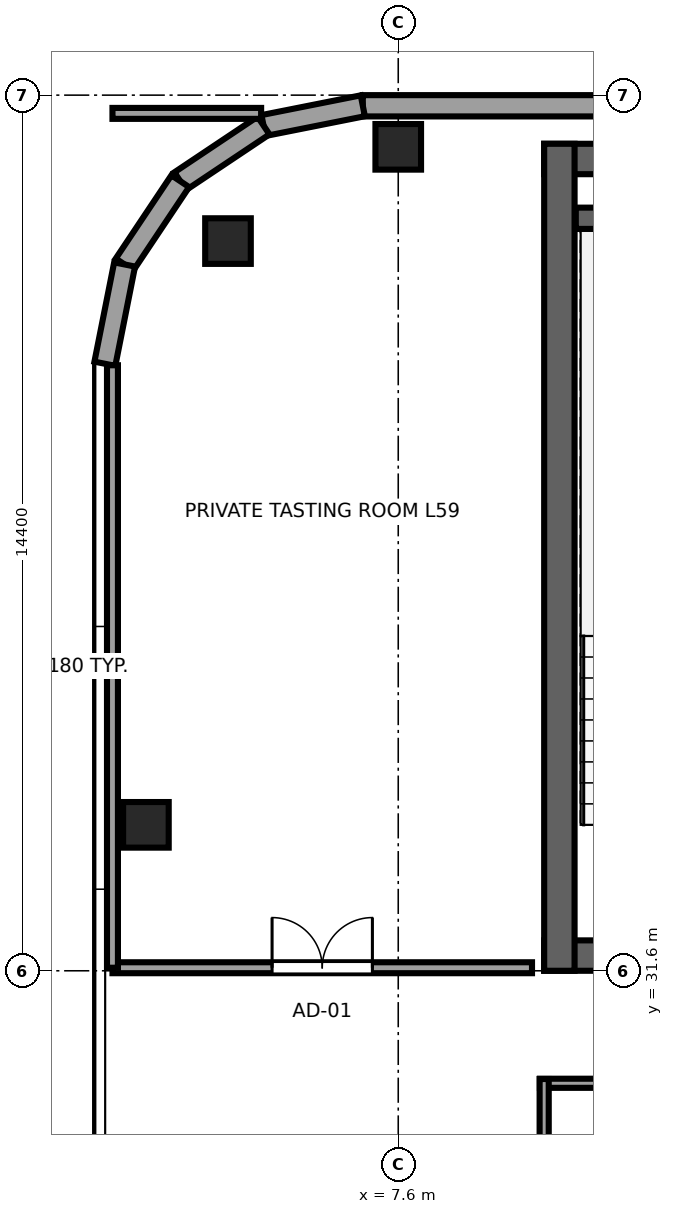
"""IFC4 building model, lengths in metres.
Left out: names, types, materials, properties, quantities, classifications, styles, units other than length and angle.
Written with IfcOpenShell. Run it as: python <this file> out.ifc"""

import sys

from ifc_helpers import new_model, si_unit, direction, frame, frame_2d, origin, origin_2d, place, context, subcontext, project, spatial, rectangle, extrude, source, transform, mapped, element, fill, save


model = new_model("IFC4")
c1 = context("Model", 3, precision=1e-05, world=origin(), true_north=direction((0.0, 1.0)))
c2 = subcontext(c1, "Body", "Model", "MODEL_VIEW")
j1 = project(units=[si_unit("LENGTHUNIT", "METRE"), si_unit("PLANEANGLEUNIT", "RADIAN")], contexts=[c1])
p1 = place(None, origin())
s1 = spatial("IfcSite", under=j1, at=p1, CompositionType="ELEMENT")
p2 = place(p1, origin())
s2 = spatial("IfcBuilding", under=s1, at=p2, CompositionType="ELEMENT")
p3 = place(p2, frame((0.0, 0.0, 223.9)))
s3 = spatial("IfcBuildingStorey", under=s2, at=p3, CompositionType="ELEMENT", Elevation=223.9)
p4 = place(p3, frame((10.0, 31.85, 0.0), z_axis=(0.0, 0.0, 1.0), x_axis=(1.0, 0.0, 0.0)))
e1 = element("IfcWall", 1, at=p4, inside=s3, PredefinedType="SHEAR", context=c2, shape_type="SweptSolid", body=[
    extrude(rectangle(XDim=26.0, YDim=0.5, at=frame_2d((13.0, 0.0))), origin(), (0.0, 0.0, 1.0), 3.55),
])
p5 = place(p4, frame((7.45, 0.0, 0.0), z_axis=(0.0, 0.0, 1.0), x_axis=(-1.0, 0.0, 0.0)))
e2 = element("IfcOpeningElement", 2, at=p5, cuts=e1, PredefinedType="OPENING", context=c2, shape_type="SweptSolid", body=[
    extrude(rectangle(XDim=1.5, YDim=2.04, at=frame_2d((0.75, 1.02))), frame((0.0, 0.26, 0.0), z_axis=(0.0, -1.0, 0.0), x_axis=(1.0, 0.0, 0.0)), (0.0, 0.0, 1.0), 0.52),
])
p6 = place(p4, frame((13.75, 0.0, 0.0), z_axis=(0.0, 0.0, 1.0), x_axis=(-1.0, 0.0, 0.0)))
e3 = element("IfcOpeningElement", 3, at=p6, cuts=e1, PredefinedType="OPENING", context=c2, shape_type="SweptSolid", body=[
    extrude(rectangle(XDim=1.5, YDim=2.04, at=frame_2d((0.75, 1.02))), frame((0.0, 0.26, 0.0), z_axis=(0.0, -1.0, 0.0), x_axis=(1.0, 0.0, 0.0)), (0.0, 0.0, 1.0), 0.52),
])
p7 = place(p4, frame((20.05, 0.0, 0.0), z_axis=(0.0, 0.0, 1.0), x_axis=(-1.0, 0.0, 0.0)))
e4 = element("IfcOpeningElement", 4, at=p7, cuts=e1, PredefinedType="OPENING", context=c2, shape_type="SweptSolid", body=[
    extrude(rectangle(XDim=1.5, YDim=2.04, at=frame_2d((0.75, 1.02))), frame((0.0, 0.26, 0.0), z_axis=(0.0, -1.0, 0.0), x_axis=(1.0, 0.0, 0.0)), (0.0, 0.0, 1.0), 0.52),
])
p8 = place(p3, frame((10.0, 44.95, 0.0), z_axis=(0.0, 0.0, 1.0), x_axis=(1.0, 0.0, 0.0)))
e5 = element("IfcWall", 5, at=p8, inside=s3, PredefinedType="SHEAR", context=c2, shape_type="SweptSolid", body=[
    extrude(rectangle(XDim=26.0, YDim=0.5, at=frame_2d((13.0, 0.0))), origin(), (0.0, 0.0, 1.0), 3.55),
])
p9 = place(p3, frame((10.25, 31.6, 0.0), z_axis=(0.0, 0.0, 1.0), x_axis=(0.0, 1.0, 0.0)))
e6 = element("IfcWall", 6, at=p9, inside=s3, PredefinedType="SHEAR", context=c2, shape_type="SweptSolid", body=[
    extrude(rectangle(XDim=13.6, YDim=0.5, at=frame_2d((6.8, 0.0))), origin(), (0.0, 0.0, 1.0), 3.55),
])
p10 = place(p3, frame((10.52, 43.975, 0.0), z_axis=(0.0, 0.0, 1.0), x_axis=(1.0, 0.0, 0.0)))
e7 = element("IfcWall", 7, at=p10, inside=s3, PredefinedType="SHEAR", context=c2, shape_type="SweptSolid", body=[
    extrude(rectangle(XDim=3.6, YDim=0.35, at=frame_2d((1.8, 0.0))), origin(), (0.0, 0.0, 1.0), 3.55),
])
m1 = source(origin(), c2, "Body", "SweptSolid", [
    extrude(rectangle(XDim=0.75, YDim=0.75, at=origin_2d()), origin(), (0.0, 0.0, 1.0), 3.55),
])
for number, where, z_axis, x_axis in (
    (8, (4.8, 43.6, 0.0), (0.0, 0.0, 1.0), (1.0, 0.0, 0.0)),
    (9, (7.6, 45.15, 0.0), (0.0, 0.0, 1.0), (1.0, 0.0, 0.0)),
    (10, (3.45, 34.0, 0.0), (0.0, 0.0, 1.0), (1.0, 0.0, 0.0)),
):
    element("IfcColumn", number, at=place(p3, frame(where, z_axis=z_axis, x_axis=x_axis)), inside=s3, PredefinedType="COLUMN", context=c2, shape_type="MappedRepresentation", body=[
        mapped(m1, transform((0.0, 0.0, 0.0), x_axis=(1.0, 0.0, 0.0), y_axis=(0.0, 1.0, 0.0), z_axis=(0.0, 0.0, 1.0), scale=1.0)),
    ])
p11 = place(p3, frame((35.383, 45.825, 0.0), z_axis=(0.0, 0.0, 1.0), x_axis=(-1.0, 0.0, 0.0)))
e11 = element("IfcWall", 11, at=p11, inside=s3, PredefinedType="SOLIDWALL", context=c2, shape_type="SweptSolid", body=[
    extrude(rectangle(XDim=28.366, YDim=0.35, at=frame_2d((14.183, 0.0))), origin(), (0.0, 0.0, 1.0), 3.37),
])
p12 = place(p11, frame((1.514, 0.0, 0.68)))
e12 = element("IfcOpeningElement", 12, at=p12, cuts=e11, PredefinedType="OPENING", context=c2, shape_type="SweptSolid", body=[
    extrude(rectangle(XDim=2.7, YDim=1.95, at=frame_2d((1.35, 0.975))), frame((0.0, 0.185, 0.0), z_axis=(0.0, -1.0, 0.0), x_axis=(1.0, 0.0, 0.0)), (0.0, 0.0, 1.0), 0.37),
])
p13 = place(p11, frame((6.041, 0.0, 0.68)))
e13 = element("IfcOpeningElement", 13, at=p13, cuts=e11, PredefinedType="OPENING", context=c2, shape_type="SweptSolid", body=[
    extrude(rectangle(XDim=2.7, YDim=1.95, at=frame_2d((1.35, 0.975))), frame((0.0, 0.185, 0.0), z_axis=(0.0, -1.0, 0.0), x_axis=(1.0, 0.0, 0.0)), (0.0, 0.0, 1.0), 0.37),
])
p14 = place(p11, frame((10.569, 0.0, 0.68)))
e14 = element("IfcOpeningElement", 14, at=p14, cuts=e11, PredefinedType="OPENING", context=c2, shape_type="SweptSolid", body=[
    extrude(rectangle(XDim=2.7, YDim=1.95, at=frame_2d((1.35, 0.975))), frame((0.0, 0.185, 0.0), z_axis=(0.0, -1.0, 0.0), x_axis=(1.0, 0.0, 0.0)), (0.0, 0.0, 1.0), 0.37),
])
p15 = place(p11, frame((15.097, 0.0, 0.68)))
e15 = element("IfcOpeningElement", 15, at=p15, cuts=e11, PredefinedType="OPENING", context=c2, shape_type="SweptSolid", body=[
    extrude(rectangle(XDim=2.7, YDim=1.95, at=frame_2d((1.35, 0.975))), frame((0.0, 0.185, 0.0), z_axis=(0.0, -1.0, 0.0), x_axis=(1.0, 0.0, 0.0)), (0.0, 0.0, 1.0), 0.37),
])
p16 = place(p11, frame((19.624, 0.0, 0.68)))
e16 = element("IfcOpeningElement", 16, at=p16, cuts=e11, PredefinedType="OPENING", context=c2, shape_type="SweptSolid", body=[
    extrude(rectangle(XDim=2.7, YDim=1.95, at=frame_2d((1.35, 0.975))), frame((0.0, 0.185, 0.0), z_axis=(0.0, -1.0, 0.0), x_axis=(1.0, 0.0, 0.0)), (0.0, 0.0, 1.0), 0.37),
])
p17 = place(p3, frame((7.017, 45.825, 0.0), z_axis=(0.0, 0.0, 1.0), x_axis=(-0.980788844421, -0.195072403631, 0.0)))
e17 = element("IfcWall", 17, at=p17, inside=s3, PredefinedType="SOLIDWALL", context=c2, shape_type="SweptSolid", body=[
    extrude(rectangle(XDim=1.665, YDim=0.35, at=frame_2d((0.832, 0.0))), origin(), (0.0, 0.0, 1.0), 3.37),
])
for number, where, z_axis, x_axis in (
    (18, (5.385, 45.5, 0.0), (0.0, 0.0, 1.0), (-0.832, -0.556, 0.0)),
    (19, (4.015, 44.585, 0.0), (0.0, 0.0, 1.0), (-0.556, -0.831, 0.0)),
):
    element("IfcWall", number, at=place(p3, frame(where, z_axis=z_axis, x_axis=x_axis)), inside=s3, PredefinedType="SOLIDWALL", context=c2, shape_type="SweptSolid", body=[
        extrude(rectangle(XDim=1.647, YDim=0.35, at=frame_2d((0.824, 0.0))), origin(), (0.0, 0.0, 1.0), 2.9),
    ])
p18 = place(p3, frame((3.1, 43.216, 0.0), z_axis=(0.0, 0.0, 1.0), x_axis=(-0.195044345786, -0.980794424524, 0.0)))
e20 = element("IfcWall", 20, at=p18, inside=s3, PredefinedType="SOLIDWALL", context=c2, shape_type="SweptSolid", body=[
    extrude(rectangle(XDim=1.665, YDim=0.35, at=frame_2d((0.833, 0.0))), origin(), (0.0, 0.0, 1.0), 3.37),
])
p19 = place(p3, frame((2.9, 31.65, 0.0), z_axis=(0.0, 0.0, 1.0), x_axis=(1.0, 0.0, 0.0)))
e21 = element("IfcWall", 21, at=p19, inside=s3, PredefinedType="PARTITIONING", context=c2, shape_type="SweptSolid", body=[
    extrude(rectangle(XDim=6.9, YDim=0.18, at=frame_2d((3.45, 0.0))), origin(), (0.0, 0.0, 1.0), 3.37),
])
p20 = place(p19, frame((2.625, 0.0, 0.0)))
e22 = element("IfcOpeningElement", 22, at=p20, cuts=e21, PredefinedType="OPENING", context=c2, shape_type="SweptSolid", body=[
    extrude(rectangle(XDim=1.65, YDim=2.15, at=frame_2d((0.825, 1.075))), frame((0.0, 0.1, 0.0), z_axis=(0.0, -1.0, 0.0), x_axis=(1.0, 0.0, 0.0)), (0.0, 0.0, 1.0), 0.2),
])
p21 = place(p3, frame((2.9, 45.7, 0.0), z_axis=(0.0, 0.0, 1.0), x_axis=(1.0, 0.0, 0.0)))
e23 = element("IfcWall", 23, at=p21, inside=s3, PredefinedType="PARTITIONING", context=c2, shape_type="SweptSolid", body=[
    extrude(rectangle(XDim=2.445, YDim=0.18, at=frame_2d((1.223, 0.0))), origin(), (0.0, 0.0, 1.0), 3.37),
])
p22 = place(p3, frame((2.9, 31.65, 0.0), z_axis=(0.0, 0.0, 1.0), x_axis=(0.0, 1.0, 0.0)))
e24 = element("IfcWall", 24, at=p22, inside=s3, PredefinedType="PARTITIONING", context=c2, shape_type="SweptSolid", body=[
    extrude(rectangle(XDim=9.908, YDim=0.18, at=frame_2d((4.954, 0.0))), origin(), (0.0, 0.0, 1.0), 3.37),
])
p23 = place(p3, frame((9.93, 29.75, 0.0), z_axis=(0.0, 0.0, 1.0), x_axis=(1.0, 0.0, 0.0)))
e25 = element("IfcWall", 25, at=p23, inside=s3, PredefinedType="PARTITIONING", context=c2, shape_type="SweptSolid", body=[
    extrude(rectangle(XDim=9.39, YDim=0.15, at=frame_2d((4.695, 0.0))), origin(), (0.0, 0.0, 1.0), 3.37),
])
p24 = place(p23, frame((4.235, 0.0, 0.0)))
e26 = element("IfcOpeningElement", 26, at=p24, cuts=e25, PredefinedType="OPENING", context=c2, shape_type="SweptSolid", body=[
    extrude(rectangle(XDim=0.92, YDim=2.01, at=frame_2d((0.46, 1.005))), frame((0.0, 0.085, 0.0), z_axis=(0.0, -1.0, 0.0), x_axis=(1.0, 0.0, 0.0)), (0.0, 0.0, 1.0), 0.17),
])
p25 = place(p3, frame((10.0, 27.03, 0.0), z_axis=(0.0, 0.0, 1.0), x_axis=(0.0, 1.0, 0.0)))
e27 = element("IfcWall", 27, at=p25, inside=s3, PredefinedType="PARTITIONING", context=c2, shape_type="SweptSolid", body=[
    extrude(rectangle(XDim=2.79, YDim=0.15, at=frame_2d((1.395, 0.0))), origin(), (0.0, 0.0, 1.0), 3.37),
])
m2 = source(origin(), c2, "Body", "SweptSolid", [
    extrude(rectangle(XDim=1.65, YDim=2.15, at=frame_2d((0.825, 1.075))), frame((0.0, 0.025, 0.0), z_axis=(0.0, -1.0, 0.0), x_axis=(1.0, 0.0, 0.0)), (0.0, 0.0, 1.0), 0.05),
])
p26 = place(p20, origin())
e28 = element("IfcDoor", 28, at=p26, inside=s3, OperationType="DOUBLE_DOOR_SINGLE_SWING", PredefinedType="DOOR", context=c2, shape_type="MappedRepresentation", body=[
    mapped(m2, transform((0.0, 0.0, 0.0), x_axis=(1.0, 0.0, 0.0), y_axis=(0.0, 1.0, 0.0), z_axis=(0.0, 0.0, 1.0), scale=1.0)),
])
fill(e22, e28)
save(model, sys.argv[1])
